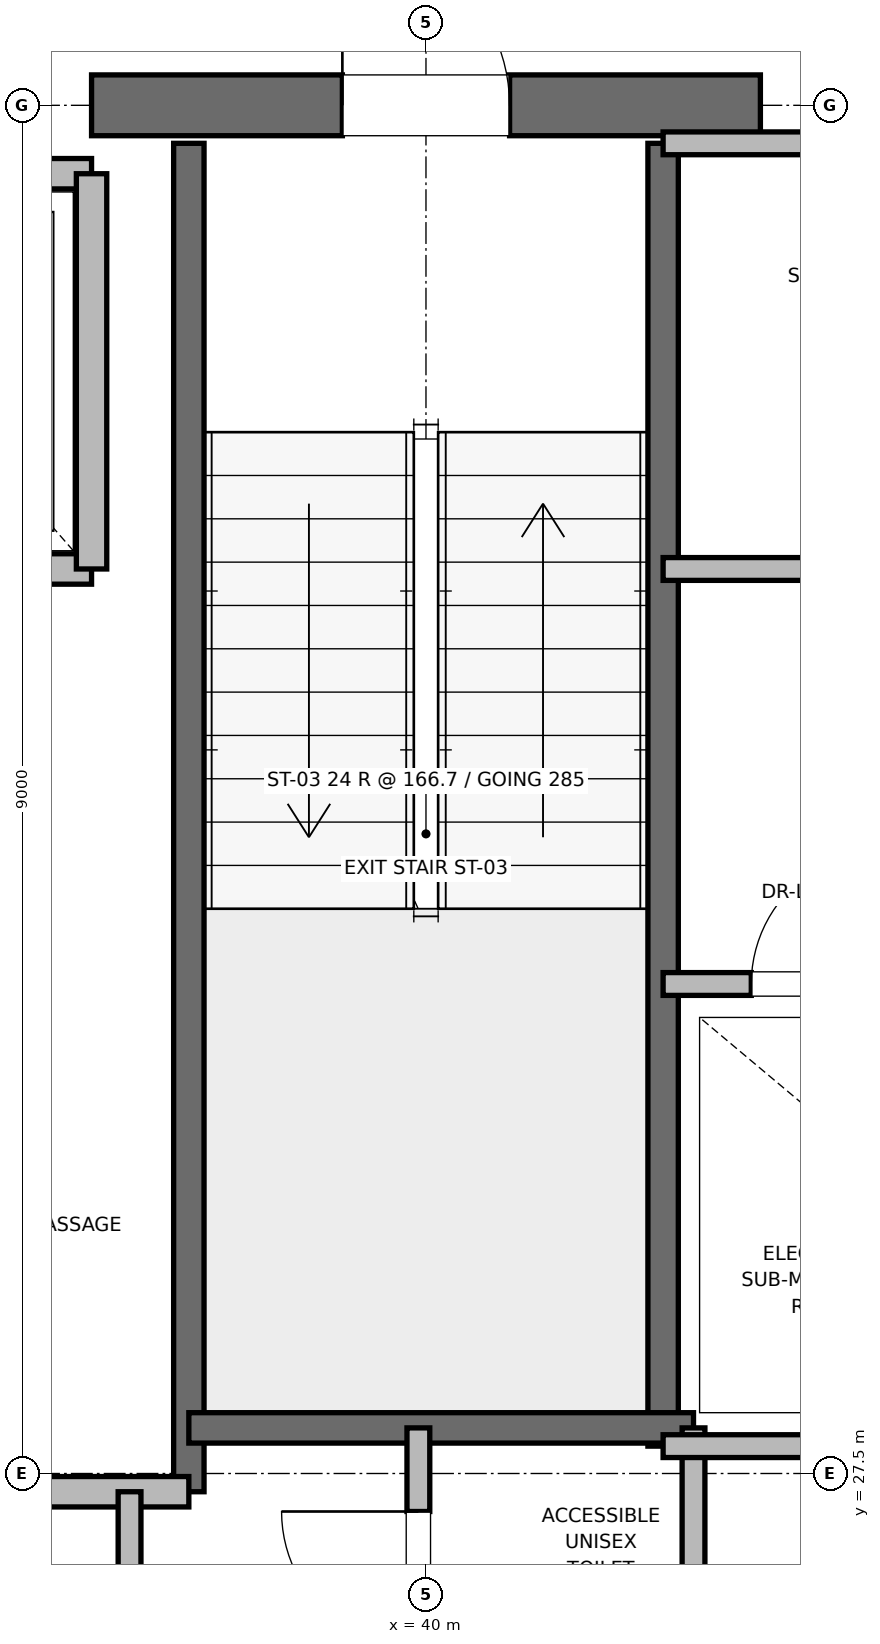
"""IFC4 building model, lengths in metres.
Left out: names, types, materials, properties, quantities, classifications, styles, units other than length and angle.
Written with IfcOpenShell. Run it as: python <this file> out.ifc"""

import sys

from ifc_helpers import new_model, si_unit, direction, frame, frame_2d, origin, place, context, subcontext, project, spatial, rectangle, extrude, element, fill, save


model = new_model("IFC4")
c1 = context("Model", 3, precision=1e-05, world=origin(), true_north=direction((0.0, 1.0)))
c2 = subcontext(c1, "Body", "Model", "MODEL_VIEW")
j1 = project(units=[si_unit("LENGTHUNIT", "METRE"), si_unit("PLANEANGLEUNIT", "RADIAN")], contexts=[c1])
p1 = place(None, origin())
s1 = spatial("IfcSite", under=j1, at=p1, CompositionType="ELEMENT")
p2 = place(p1, origin())
s2 = spatial("IfcBuilding", under=s1, at=p2, CompositionType="ELEMENT")
p3 = place(p2, frame((0.0, 0.0, 330.8)))
s3 = spatial("IfcBuildingStorey", under=s2, at=p3, CompositionType="ELEMENT", Elevation=330.8)
p4 = place(p3, frame((37.8, 36.5, 0.0), z_axis=(0.0, 0.0, 1.0), x_axis=(1.0, 0.0, 0.0)))
e1 = element("IfcWall", 1, at=p4, inside=s3, PredefinedType="SHEAR", context=c2, shape_type="SweptSolid", body=[
    extrude(rectangle(XDim=4.4, YDim=0.4, at=frame_2d((2.2, 0.0))), origin(), (0.0, 0.0, 1.0), 3.785),
])
p5 = place(p4, frame((1.65, 0.0, 0.0)))
e2 = element("IfcOpeningElement", 2, at=p5, cuts=e1, PredefinedType="OPENING", context=c2, shape_type="SweptSolid", body=[
    extrude(rectangle(XDim=1.1, YDim=2.15, at=frame_2d((0.55, 1.075))), frame((0.0, 0.2, 0.0), z_axis=(0.0, -1.0, 0.0), x_axis=(1.0, 0.0, 0.0)), (0.0, 0.0, 1.0), 0.4),
])
p6 = place(p3, frame((38.44, 27.38, 0.0), z_axis=(0.0, 0.0, 1.0), x_axis=(0.0, 1.0, 0.0)))
e3 = element("IfcWall", 3, at=p6, inside=s3, PredefinedType="SOLIDWALL", context=c2, shape_type="SweptSolid", body=[
    extrude(rectangle(XDim=8.87, YDim=0.2, at=frame_2d((4.435, 0.0))), origin(), (0.0, 0.0, 1.0), 3.785),
])
p7 = place(p3, frame((41.56, 27.68, 0.0), z_axis=(0.0, 0.0, 1.0), x_axis=(0.0, 1.0, 0.0)))
e4 = element("IfcWall", 4, at=p7, inside=s3, PredefinedType="SOLIDWALL", context=c2, shape_type="SweptSolid", body=[
    extrude(rectangle(XDim=8.57, YDim=0.2, at=frame_2d((4.285, 0.0))), origin(), (0.0, 0.0, 1.0), 3.785),
])
p8 = place(p3, frame((38.44, 27.8, 0.0), z_axis=(0.0, 0.0, 1.0), x_axis=(1.0, 0.0, 0.0)))
e5 = element("IfcWall", 5, at=p8, inside=s3, PredefinedType="SOLIDWALL", context=c2, shape_type="SweptSolid", body=[
    extrude(rectangle(XDim=3.32, YDim=0.2, at=frame_2d((1.66, 0.0))), origin(), (0.0, 0.0, 1.0), 3.785),
])
p9 = place(p3, frame((32.82, 27.38, 0.0), z_axis=(0.0, 0.0, 1.0), x_axis=(1.0, 0.0, 0.0)))
e6 = element("IfcWall", 6, at=p9, inside=s3, PredefinedType="PARTITIONING", context=c2, shape_type="SweptSolid", body=[
    extrude(rectangle(XDim=5.62, YDim=0.2, at=frame_2d((2.81, 0.0))), origin(), (0.0, 0.0, 1.0), 3.785),
])
p10 = place(p3, frame((35.5, 33.45, 0.0), z_axis=(0.0, 0.0, 1.0), x_axis=(1.0, 0.0, 0.0)))
e7 = element("IfcWall", 7, at=p10, inside=s3, PredefinedType="SOLIDWALL", context=c2, shape_type="SweptSolid", body=[
    extrude(rectangle(XDim=2.3, YDim=0.2, at=frame_2d((1.15, 0.0))), origin(), (0.0, 0.0, 1.0), 3.785),
])
p11 = place(p10, frame((0.6, 0.0, 0.0)))
e8 = element("IfcOpeningElement", 8, at=p11, cuts=e7, PredefinedType="OPENING", context=c2, shape_type="SweptSolid", body=[
    extrude(rectangle(XDim=1.1, YDim=2.2, at=frame_2d((0.55, 1.1))), frame((0.0, 0.1, 0.0), z_axis=(0.0, -1.0, 0.0), x_axis=(1.0, 0.0, 0.0)), (0.0, 0.0, 1.0), 0.2),
])
p12 = place(p3, frame((37.8, 36.05, 0.0), z_axis=(0.0, 0.0, 1.0), x_axis=(-1.0, 0.0, 0.0)))
e9 = element("IfcWall", 9, at=p12, inside=s3, PredefinedType="SOLIDWALL", context=c2, shape_type="SweptSolid", body=[
    extrude(rectangle(XDim=2.3, YDim=0.2, at=frame_2d((1.15, 0.0))), origin(), (0.0, 0.0, 1.0), 2.865),
])
p13 = place(p3, frame((37.8, 33.45, 0.0), z_axis=(0.0, 0.0, 1.0), x_axis=(0.0, 1.0, 0.0)))
e10 = element("IfcWall", 10, at=p13, inside=s3, PredefinedType="SOLIDWALL", context=c2, shape_type="SweptSolid", body=[
    extrude(rectangle(XDim=2.6, YDim=0.2, at=frame_2d((1.3, 0.0))), origin(), (0.0, 0.0, 1.0), 2.865),
])
p14 = place(p3, frame((41.76, 23.8, 0.0), z_axis=(0.0, 0.0, 1.0), x_axis=(0.0, 1.0, 0.0)))
e11 = element("IfcWall", 11, at=p14, inside=s3, PredefinedType="PARTITIONING", context=c2, shape_type="SweptSolid", body=[
    extrude(rectangle(XDim=4.0, YDim=0.15, at=frame_2d((2.0, 0.0))), origin(), (0.0, 0.0, 1.0), 2.85),
])
p15 = place(p3, frame((39.95, 25.8, 0.0), z_axis=(0.0, 0.0, 1.0), x_axis=(0.0, 1.0, 0.0)))
e12 = element("IfcWall", 12, at=p15, inside=s3, PredefinedType="PARTITIONING", context=c2, shape_type="SweptSolid", body=[
    extrude(rectangle(XDim=2.0, YDim=0.15, at=frame_2d((1.0, 0.0))), origin(), (0.0, 0.0, 1.0), 2.85),
])
p16 = place(p15, frame((0.55, 0.0, 0.0)))
e13 = element("IfcOpeningElement", 13, at=p16, cuts=e12, PredefinedType="OPENING", context=c2, shape_type="SweptSolid", body=[
    extrude(rectangle(XDim=0.9, YDim=2.1, at=frame_2d((0.45, 1.05))), frame((0.0, 0.075, 0.0), z_axis=(0.0, -1.0, 0.0), x_axis=(1.0, 0.0, 0.0)), (0.0, 0.0, 1.0), 0.15),
])
p17 = place(p3, frame((38.05, 24.5, 0.0), z_axis=(0.0, 0.0, 1.0), x_axis=(0.0, 1.0, 0.0)))
e14 = element("IfcWall", 14, at=p17, inside=s3, PredefinedType="PARTITIONING", context=c2, shape_type="SweptSolid", body=[
    extrude(rectangle(XDim=2.88, YDim=0.15, at=frame_2d((1.44, 0.0))), origin(), (0.0, 0.0, 1.0), 2.85),
])
p18 = place(p17, frame((0.94, 0.0, 0.0)))
e15 = element("IfcOpeningElement", 15, at=p18, cuts=e14, PredefinedType="OPENING", context=c2, shape_type="SweptSolid", body=[
    extrude(rectangle(XDim=1.0, YDim=2.15, at=frame_2d((0.5, 1.075))), frame((0.0, 0.075, 0.0), z_axis=(0.0, -1.0, 0.0), x_axis=(1.0, 0.0, 0.0)), (0.0, 0.0, 1.0), 0.15),
])
p19 = place(p3, frame((41.56, 27.68, 0.0), z_axis=(0.0, 0.0, 1.0), x_axis=(1.0, 0.0, 0.0)))
e16 = element("IfcWall", 16, at=p19, inside=s3, PredefinedType="PARTITIONING", context=c2, shape_type="SweptSolid", body=[
    extrude(rectangle(XDim=3.59, YDim=0.15, at=frame_2d((1.795, 0.0))), origin(), (0.0, 0.0, 1.0), 2.85),
])
p20 = place(p3, frame((41.56, 30.72, 0.0), z_axis=(0.0, 0.0, 1.0), x_axis=(1.0, 0.0, 0.0)))
e17 = element("IfcWall", 17, at=p20, inside=s3, PredefinedType="PARTITIONING", context=c2, shape_type="SweptSolid", body=[
    extrude(rectangle(XDim=2.04, YDim=0.15, at=frame_2d((1.02, 0.0))), origin(), (0.0, 0.0, 1.0), 2.85),
])
p21 = place(p20, frame((0.58, 0.0, 0.0)))
e18 = element("IfcOpeningElement", 18, at=p21, cuts=e17, PredefinedType="OPENING", context=c2, shape_type="SweptSolid", body=[
    extrude(rectangle(XDim=0.88, YDim=2.1, at=frame_2d((0.44, 1.05))), frame((0.0, 0.075, 0.0), z_axis=(0.0, -1.0, 0.0), x_axis=(1.0, 0.0, 0.0)), (0.0, 0.0, 1.0), 0.15),
])
p22 = place(p3, frame((41.56, 36.25, 0.0), z_axis=(0.0, 0.0, 1.0), x_axis=(1.0, 0.0, 0.0)))
e19 = element("IfcWall", 19, at=p22, inside=s3, PredefinedType="PARTITIONING", context=c2, shape_type="SweptSolid", body=[
    extrude(rectangle(XDim=2.94, YDim=0.15, at=frame_2d((1.47, 0.0))), origin(), (0.0, 0.0, 1.0), 2.85),
])
p23 = place(p3, frame((41.56, 33.45, 0.0), z_axis=(0.0, 0.0, 1.0), x_axis=(1.0, 0.0, 0.0)))
e20 = element("IfcWall", 20, at=p23, inside=s3, PredefinedType="PARTITIONING", context=c2, shape_type="SweptSolid", body=[
    extrude(rectangle(XDim=2.94, YDim=0.15, at=frame_2d((1.47, 0.0))), origin(), (0.0, 0.0, 1.0), 2.85),
])
p24 = place(p23, frame((1.03, 0.0, 0.0)))
e21 = element("IfcOpeningElement", 21, at=p24, cuts=e20, PredefinedType="OPENING", context=c2, shape_type="SweptSolid", body=[
    extrude(rectangle(XDim=0.88, YDim=2.1, at=frame_2d((0.44, 1.05))), frame((0.0, 0.075, 0.0), z_axis=(0.0, -1.0, 0.0), x_axis=(1.0, 0.0, 0.0)), (0.0, 0.0, 1.0), 0.15),
])
p25 = place(p5, origin())
e22 = element("IfcDoor", 22, at=p25, inside=s3, OperationType="SINGLE_SWING_LEFT", PredefinedType="DOOR", context=c2, shape_type="SweptSolid", body=[
    extrude(rectangle(XDim=1.1, YDim=2.15, at=frame_2d((0.55, 1.075))), frame((0.0, 0.025, 0.0), z_axis=(0.0, -1.0, 0.0), x_axis=(1.0, 0.0, 0.0)), (0.0, 0.0, 1.0), 0.05),
])
fill(e2, e22)
p26 = place(p16, origin())
e23 = element("IfcDoor", 23, at=p26, inside=s3, OperationType="SINGLE_SWING_RIGHT", PredefinedType="DOOR", context=c2, shape_type="SweptSolid", body=[
    extrude(rectangle(XDim=0.9, YDim=2.1, at=frame_2d((0.45, 1.05))), frame((0.0, 0.025, 0.0), z_axis=(0.0, -1.0, 0.0), x_axis=(1.0, 0.0, 0.0)), (0.0, 0.0, 1.0), 0.05),
])
fill(e13, e23)
p27 = place(p21, origin())
e24 = element("IfcDoor", 24, at=p27, inside=s3, OperationType="SINGLE_SWING_RIGHT", PredefinedType="DOOR", context=c2, shape_type="SweptSolid", body=[
    extrude(rectangle(XDim=0.88, YDim=2.1, at=frame_2d((0.44, 1.05))), frame((0.0, 0.025, 0.0), z_axis=(0.0, -1.0, 0.0), x_axis=(1.0, 0.0, 0.0)), (0.0, 0.0, 1.0), 0.05),
])
fill(e18, e24)
save(model, sys.argv[1])
